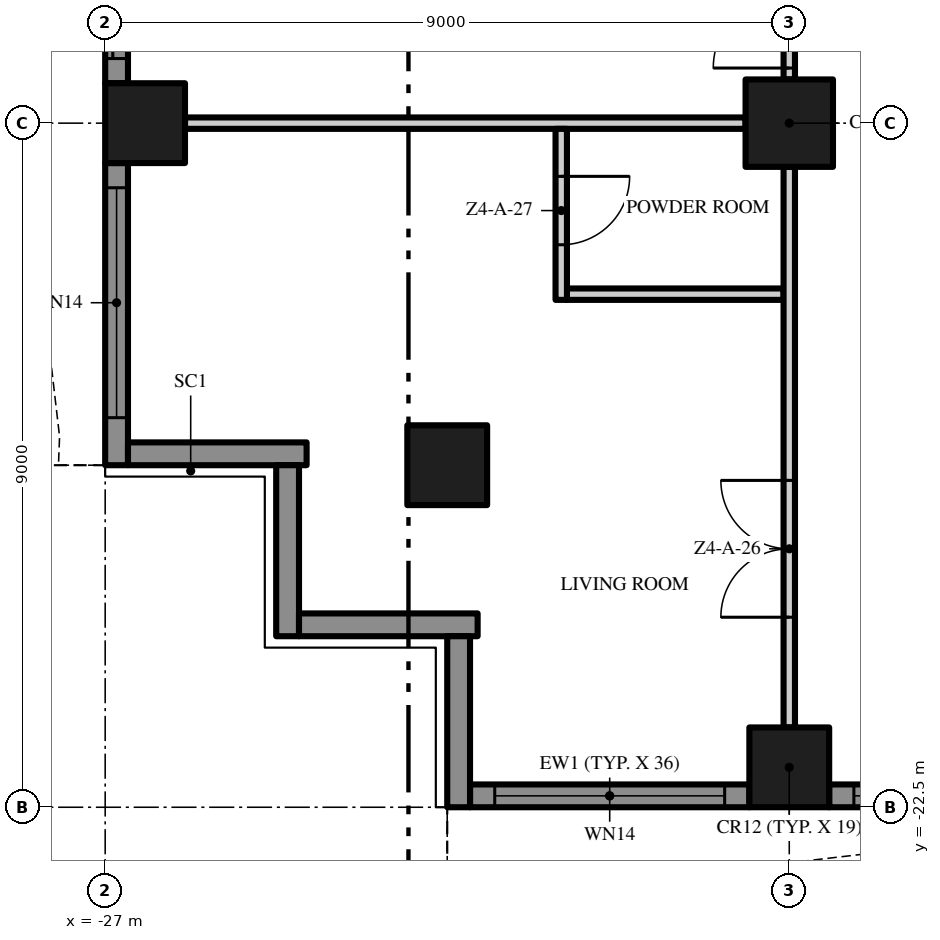
"""IFC4 building model, lengths in metres.
Left out: names, types, materials, properties, quantities, classifications, styles, units other than length and angle.
Written with IfcOpenShell. Run it as: python <this file> out.ifc"""

import sys

from ifc_helpers import new_model, si_unit, direction, frame, frame_2d, origin, origin_2d, place, context, subcontext, project, spatial, polyline, rectangle, outline, extrude, element, fill, save


model = new_model("IFC4")
c1 = context("Model", 3, precision=1e-05, world=origin(), true_north=direction((0.0, 1.0)))
c2 = subcontext(c1, "Body", "Model", "MODEL_VIEW")
j1 = project(units=[si_unit("LENGTHUNIT", "METRE"), si_unit("PLANEANGLEUNIT", "RADIAN")], contexts=[c1])
p1 = place(None, origin())
s1 = spatial("IfcSite", under=j1, at=p1, CompositionType="ELEMENT")
p2 = place(p1, origin())
s2 = spatial("IfcBuilding", under=s1, at=p2, CompositionType="ELEMENT")
p3 = place(p2, frame((0.0, 0.0, 192.0)))
s3 = spatial("IfcBuildingStorey", under=s2, at=p3, CompositionType="ELEMENT", Elevation=192.0)
p4 = place(p3, frame((-18.0, -13.5, 0.0), z_axis=(0.0, 0.0, 1.0), x_axis=(1.0, 0.0, 0.0)))
e1 = element("IfcColumn", 1, at=p4, inside=s3, PredefinedType="COLUMN", context=c2, shape_type="SweptSolid", body=[
    extrude(rectangle(XDim=1.15, YDim=1.15, at=origin_2d()), origin(), (0.0, 0.0, 1.0), 3.5),
])
for number, where, z_axis, x_axis in (
    (2, (-18.0, -21.975, 0.0), (0.0, 0.0, 1.0), (1.0, 0.0, 0.0)),
    (3, (-26.475, -13.5, 0.0), (0.0, 0.0, 1.0), (1.0, 0.0, 0.0)),
    (4, (-22.5, -18.0, 0.0), (0.0, 0.0, 1.0), (1.0, 0.0, 0.0)),
):
    element("IfcColumn", number, at=place(p3, frame(where, z_axis=z_axis, x_axis=x_axis)), inside=s3, PredefinedType="COLUMN", context=c2, shape_type="SweptSolid", body=[
        extrude(rectangle(XDim=1.05, YDim=1.05, at=origin_2d()), origin(), (0.0, 0.0, 1.0), 3.5),
    ])
p5 = place(p3, frame((-18.525, -22.35, 0.0), z_axis=(0.0, 0.0, 1.0), x_axis=(-1.0, 0.0, 0.0)))
e5 = element("IfcWall", 5, at=p5, inside=s3, PredefinedType="SOLIDWALL", context=c2, shape_type="SweptSolid", body=[
    extrude(rectangle(XDim=3.675, YDim=0.3, at=frame_2d((1.837, 0.0))), origin(), (0.0, 0.0, 1.0), 3.5),
])
p6 = place(p5, frame((0.325, 0.0, 0.45)))
e6 = element("IfcOpeningElement", 6, at=p6, cuts=e5, PredefinedType="OPENING", context=c2, shape_type="SweptSolid", body=[
    extrude(rectangle(XDim=3.025, YDim=2.65, at=frame_2d((1.512, 1.325))), frame((0.0, 0.16, 0.0), z_axis=(0.0, -1.0, 0.0), x_axis=(1.0, 0.0, 0.0)), (0.0, 0.0, 1.0), 0.32),
])
p7 = place(p3, frame((-9.525, -22.35, 0.0), z_axis=(0.0, 0.0, 1.0), x_axis=(-1.0, 0.0, 0.0)))
e7 = element("IfcWall", 7, at=p7, inside=s3, PredefinedType="SOLIDWALL", context=c2, shape_type="SweptSolid", body=[
    extrude(rectangle(XDim=7.95, YDim=0.3, at=frame_2d((3.975, 0.0))), origin(), (0.0, 0.0, 1.0), 3.5),
])
p8 = place(p7, frame((4.6, 0.0, 0.45)))
e8 = element("IfcOpeningElement", 8, at=p8, cuts=e7, PredefinedType="OPENING", context=c2, shape_type="SweptSolid", body=[
    extrude(rectangle(XDim=3.025, YDim=2.65, at=frame_2d((1.512, 1.325))), frame((0.0, 0.16, 0.0), z_axis=(0.0, -1.0, 0.0), x_axis=(1.0, 0.0, 0.0)), (0.0, 0.0, 1.0), 0.32),
])
p9 = place(p7, frame((0.325, 0.0, 0.0)))
e9 = element("IfcOpeningElement", 9, at=p9, cuts=e7, PredefinedType="OPENING", context=c2, shape_type="SweptSolid", body=[
    extrude(rectangle(XDim=3.025, YDim=2.4, at=frame_2d((1.512, 1.2))), frame((0.0, 0.16, 0.0), z_axis=(0.0, -1.0, 0.0), x_axis=(1.0, 0.0, 0.0)), (0.0, 0.0, 1.0), 0.32),
])
p10 = place(p3, frame((-26.85, -12.975, 0.0), z_axis=(0.0, 0.0, 1.0), x_axis=(0.0, 1.0, 0.0)))
e10 = element("IfcWall", 10, at=p10, inside=s3, PredefinedType="SOLIDWALL", context=c2, shape_type="SweptSolid", body=[
    extrude(rectangle(XDim=7.95, YDim=0.3, at=frame_2d((3.975, 0.0))), origin(), (0.0, 0.0, 1.0), 3.5),
])
p11 = place(p10, frame((4.6, 0.0, 0.45)))
e11 = element("IfcOpeningElement", 11, at=p11, cuts=e10, PredefinedType="OPENING", context=c2, shape_type="SweptSolid", body=[
    extrude(rectangle(XDim=3.025, YDim=2.65, at=frame_2d((1.512, 1.325))), frame((0.0, 0.16, 0.0), z_axis=(0.0, -1.0, 0.0), x_axis=(1.0, 0.0, 0.0)), (0.0, 0.0, 1.0), 0.32),
])
p12 = place(p10, frame((0.325, 0.0, 0.0)))
e12 = element("IfcOpeningElement", 12, at=p12, cuts=e10, PredefinedType="OPENING", context=c2, shape_type="SweptSolid", body=[
    extrude(rectangle(XDim=3.025, YDim=2.4, at=frame_2d((1.512, 1.2))), frame((0.0, 0.16, 0.0), z_axis=(0.0, -1.0, 0.0), x_axis=(1.0, 0.0, 0.0)), (0.0, 0.0, 1.0), 0.32),
])
p13 = place(p3, frame((-26.85, -18.0, 0.0), z_axis=(0.0, 0.0, 1.0), x_axis=(0.0, 1.0, 0.0)))
e13 = element("IfcWall", 13, at=p13, inside=s3, PredefinedType="SOLIDWALL", context=c2, shape_type="SweptSolid", body=[
    extrude(rectangle(XDim=3.975, YDim=0.3, at=frame_2d((1.988, 0.0))), origin(), (0.0, 0.0, 1.0), 3.5),
])
p14 = place(p13, frame((0.625, 0.0, 0.45)))
e14 = element("IfcOpeningElement", 14, at=p14, cuts=e13, PredefinedType="OPENING", context=c2, shape_type="SweptSolid", body=[
    extrude(rectangle(XDim=3.025, YDim=2.65, at=frame_2d((1.512, 1.325))), frame((0.0, 0.16, 0.0), z_axis=(0.0, -1.0, 0.0), x_axis=(1.0, 0.0, 0.0)), (0.0, 0.0, 1.0), 0.32),
])
p15 = place(p3, frame((-24.35, -17.85, 0.0), z_axis=(0.0, 0.0, 1.0), x_axis=(-1.0, 0.0, 0.0)))
e15 = element("IfcWall", 15, at=p15, inside=s3, PredefinedType="SOLIDWALL", context=c2, shape_type="SweptSolid", body=[
    extrude(rectangle(XDim=2.35, YDim=0.3, at=frame_2d((1.175, 0.0))), origin(), (0.0, 0.0, 1.0), 3.5),
])
p16 = place(p3, frame((-24.6, -20.25, 0.0), z_axis=(0.0, 0.0, 1.0), x_axis=(0.0, 1.0, 0.0)))
e16 = element("IfcWall", 16, at=p16, inside=s3, PredefinedType="SOLIDWALL", context=c2, shape_type="SweptSolid", body=[
    extrude(rectangle(XDim=2.25, YDim=0.3, at=frame_2d((1.125, 0.0))), origin(), (0.0, 0.0, 1.0), 3.5),
])
p17 = place(p3, frame((-22.1, -20.1, 0.0), z_axis=(0.0, 0.0, 1.0), x_axis=(-1.0, 0.0, 0.0)))
e17 = element("IfcWall", 17, at=p17, inside=s3, PredefinedType="SOLIDWALL", context=c2, shape_type="SweptSolid", body=[
    extrude(rectangle(XDim=2.35, YDim=0.3, at=frame_2d((1.175, 0.0))), origin(), (0.0, 0.0, 1.0), 3.5),
])
p18 = place(p3, frame((-22.35, -22.5, 0.0), z_axis=(0.0, 0.0, 1.0), x_axis=(0.0, 1.0, 0.0)))
e18 = element("IfcWall", 18, at=p18, inside=s3, PredefinedType="SOLIDWALL", context=c2, shape_type="SweptSolid", body=[
    extrude(rectangle(XDim=2.25, YDim=0.3, at=frame_2d((1.125, 0.0))), origin(), (0.0, 0.0, 1.0), 3.5),
])
p19 = place(p3, origin())
e19 = element("IfcWall", 19, at=p19, inside=s3, PredefinedType="USERDEFINED", context=c2, shape_type="SweptSolid", body=[
    extrude(outline(polyline([(-22.5, -25.149), (-21.0, -24.488), (-19.5, -23.755), (-18.0, -23.231), (-16.875, -23.1), (-16.5, -23.115), (-15.0, -23.451), (-13.5, -24.112), (-12.0, -24.845), (-10.5, -25.369), (-9.375, -25.5), (-9.0, -25.485), (-7.5, -25.149), (-6.0, -24.488), (-4.5, -23.755), (-3.0, -23.231), (-1.875, -23.1), (-1.5, -23.115), (0.0, -23.451), (1.5, -24.112), (3.0, -24.845), (4.5, -25.369), (5.625, -25.5), (6.0, -25.485), (7.5, -25.149), (9.0, -24.488), (10.5, -23.755), (12.0, -23.231), (13.125, -23.1), (13.5, -23.115), (15.0, -23.451), (16.5, -24.112), (18.0, -24.845), (19.5, -25.369), (20.625, -25.5), (21.0, -25.485), (22.5, -25.149), (22.445, -24.905), (20.967, -25.236), (20.635, -25.249), (19.556, -25.124), (18.096, -24.614), (16.605, -23.885), (15.079, -23.213), (13.533, -22.866), (13.115, -22.849), (11.944, -22.986), (10.404, -23.524), (8.895, -24.261), (7.421, -24.91), (5.967, -25.236), (5.635, -25.249), (4.556, -25.124), (3.096, -24.614), (1.605, -23.885), (0.079, -23.213), (-1.467, -22.866), (-1.885, -22.849), (-3.056, -22.986), (-4.596, -23.524), (-6.105, -24.261), (-7.579, -24.91), (-9.033, -25.236), (-9.365, -25.249), (-10.444, -25.124), (-11.904, -24.614), (-13.395, -23.885), (-14.921, -23.213), (-16.467, -22.866), (-16.885, -22.849), (-18.056, -22.986), (-19.596, -23.524), (-21.105, -24.261), (-22.601, -24.92), (-22.5, -25.149)])), origin(), (0.0, 0.0, 1.0), 0.9),
])
p20 = place(p3, origin())
e20 = element("IfcWall", 20, at=p20, inside=s3, PredefinedType="USERDEFINED", context=c2, shape_type="SweptSolid", body=[
    extrude(outline(polyline([(-29.649, 18.0), (-28.988, 16.5), (-28.255, 15.0), (-27.731, 13.5), (-27.6, 12.375), (-27.615, 12.0), (-27.951, 10.5), (-28.612, 9.0), (-29.345, 7.5), (-29.869, 6.0), (-30.0, 4.875), (-29.985, 4.5), (-29.649, 3.0), (-28.988, 1.5), (-28.255, 0.0), (-27.731, -1.5), (-27.6, -2.625), (-27.615, -3.0), (-27.951, -4.5), (-28.612, -6.0), (-29.345, -7.5), (-29.869, -9.0), (-30.0, -10.125), (-29.985, -10.5), (-29.649, -12.0), (-28.988, -13.5), (-28.255, -15.0), (-27.731, -16.5), (-27.6, -17.625), (-27.615, -18.0), (-27.365, -18.01), (-27.349, -17.615), (-27.486, -16.444), (-28.024, -14.904), (-28.761, -13.395), (-29.41, -11.921), (-29.736, -10.467), (-29.749, -10.135), (-29.624, -9.056), (-29.114, -7.596), (-28.385, -6.105), (-27.713, -4.579), (-27.366, -3.033), (-27.349, -2.615), (-27.486, -1.444), (-28.024, 0.096), (-28.761, 1.605), (-29.41, 3.079), (-29.736, 4.533), (-29.749, 4.865), (-29.624, 5.944), (-29.114, 7.404), (-28.385, 8.895), (-27.713, 10.421), (-27.366, 11.967), (-27.349, 12.385), (-27.486, 13.556), (-28.024, 15.096), (-28.761, 16.605), (-29.42, 18.101), (-29.649, 18.0)])), origin(), (0.0, 0.0, 1.0), 0.9),
])
p21 = place(p3, frame((-20.925, -15.75, 0.0), z_axis=(0.0, 0.0, 1.0), x_axis=(1.0, 0.0, 0.0)))
e21 = element("IfcWall", 21, at=p21, inside=s3, PredefinedType="PARTITIONING", context=c2, shape_type="SweptSolid", body=[
    extrude(rectangle(XDim=2.85, YDim=0.15, at=frame_2d((1.425, 0.0))), origin(), (0.0, 0.0, 1.0), 3.5),
])
p22 = place(p3, frame((-25.95, -13.5, 0.0), z_axis=(0.0, 0.0, 1.0), x_axis=(1.0, 0.0, 0.0)))
e22 = element("IfcWall", 22, at=p22, inside=s3, PredefinedType="PARTITIONING", context=c2, shape_type="SweptSolid", body=[
    extrude(rectangle(XDim=7.375, YDim=0.15, at=frame_2d((3.688, 0.0))), origin(), (0.0, 0.0, 1.0), 3.5),
])
p23 = place(p3, frame((-21.0, -13.575, 0.0), z_axis=(0.0, 0.0, 1.0), x_axis=(0.0, -1.0, 0.0)))
e23 = element("IfcWall", 23, at=p23, inside=s3, PredefinedType="PARTITIONING", context=c2, shape_type="SweptSolid", body=[
    extrude(rectangle(XDim=2.25, YDim=0.15, at=frame_2d((1.125, 0.0))), origin(), (0.0, 0.0, 1.0), 3.5),
])
p24 = place(p23, frame((0.625, 0.0, 0.0)))
e24 = element("IfcOpeningElement", 24, at=p24, cuts=e23, PredefinedType="OPENING", context=c2, shape_type="SweptSolid", body=[
    extrude(rectangle(XDim=0.9, YDim=2.1, at=frame_2d((0.45, 1.05))), frame((0.0, 0.085, 0.0), z_axis=(0.0, -1.0, 0.0), x_axis=(1.0, 0.0, 0.0)), (0.0, 0.0, 1.0), 0.17),
])
p25 = place(p3, frame((-18.0, -21.45, 0.0), z_axis=(0.0, 0.0, 1.0), x_axis=(0.0, 1.0, 0.0)))
e25 = element("IfcWall", 25, at=p25, inside=s3, PredefinedType="PARTITIONING", context=c2, shape_type="SweptSolid", body=[
    extrude(rectangle(XDim=7.375, YDim=0.15, at=frame_2d((3.688, 0.0))), origin(), (0.0, 0.0, 1.0), 3.5),
])
p26 = place(p25, frame((1.45, 0.0, 0.0)))
e26 = element("IfcOpeningElement", 26, at=p26, cuts=e25, PredefinedType="OPENING", context=c2, shape_type="SweptSolid", body=[
    extrude(rectangle(XDim=1.8, YDim=2.4, at=frame_2d((0.9, 1.2))), frame((0.0, 0.085, 0.0), z_axis=(0.0, -1.0, 0.0), x_axis=(1.0, 0.0, 0.0)), (0.0, 0.0, 1.0), 0.17),
])
p27 = place(p3, frame((-18.0, -12.925, 0.0), z_axis=(0.0, 0.0, 1.0), x_axis=(0.0, 1.0, 0.0)))
e27 = element("IfcWall", 27, at=p27, inside=s3, PredefinedType="PARTITIONING", context=c2, shape_type="SweptSolid", body=[
    extrude(rectangle(XDim=7.85, YDim=0.15, at=frame_2d((3.925, 0.0))), origin(), (0.0, 0.0, 1.0), 3.5),
])
p28 = place(p27, frame((6.7, 0.0, 0.0)))
e28 = element("IfcOpeningElement", 28, at=p28, cuts=e27, PredefinedType="OPENING", context=c2, shape_type="SweptSolid", body=[
    extrude(rectangle(XDim=1.0, YDim=2.4, at=frame_2d((0.5, 1.2))), frame((0.0, 0.085, 0.0), z_axis=(0.0, -1.0, 0.0), x_axis=(1.0, 0.0, 0.0)), (0.0, 0.0, 1.0), 0.17),
])
p29 = place(p27, frame((0.15, 0.0, 0.0)))
e29 = element("IfcOpeningElement", 29, at=p29, cuts=e27, PredefinedType="OPENING", context=c2, shape_type="SweptSolid", body=[
    extrude(rectangle(XDim=1.0, YDim=2.4, at=frame_2d((0.5, 1.2))), frame((0.0, 0.085, 0.0), z_axis=(0.0, -1.0, 0.0), x_axis=(1.0, 0.0, 0.0)), (0.0, 0.0, 1.0), 0.17),
])
p30 = place(p6, origin())
e30 = element("IfcWindow", 30, at=p30, inside=s3, PartitioningType="SINGLE_PANEL", PredefinedType="WINDOW", context=c2, shape_type="SweptSolid", body=[
    extrude(rectangle(XDim=3.025, YDim=2.65, at=frame_2d((1.512, 1.325))), frame((0.0, 0.03, 0.0), z_axis=(0.0, -1.0, 0.0), x_axis=(1.0, 0.0, 0.0)), (0.0, 0.0, 1.0), 0.06),
])
fill(e6, e30)
p31 = place(p8, origin())
e31 = element("IfcWindow", 31, at=p31, inside=s3, PartitioningType="SINGLE_PANEL", PredefinedType="WINDOW", context=c2, shape_type="SweptSolid", body=[
    extrude(rectangle(XDim=3.025, YDim=2.65, at=frame_2d((1.512, 1.325))), frame((0.0, 0.03, 0.0), z_axis=(0.0, -1.0, 0.0), x_axis=(1.0, 0.0, 0.0)), (0.0, 0.0, 1.0), 0.06),
])
fill(e8, e31)
p32 = place(p12, origin())
e32 = element("IfcDoor", 32, at=p32, inside=s3, OperationType="SINGLE_SWING_LEFT", PredefinedType="DOOR", context=c2, shape_type="SweptSolid", body=[
    extrude(rectangle(XDim=3.025, YDim=2.4, at=frame_2d((1.512, 1.2))), frame((0.0, 0.025, 0.0), z_axis=(0.0, -1.0, 0.0), x_axis=(1.0, 0.0, 0.0)), (0.0, 0.0, 1.0), 0.05),
])
fill(e12, e32)
p33 = place(p14, origin())
e33 = element("IfcWindow", 33, at=p33, inside=s3, PartitioningType="SINGLE_PANEL", PredefinedType="WINDOW", context=c2, shape_type="SweptSolid", body=[
    extrude(rectangle(XDim=3.025, YDim=2.65, at=frame_2d((1.512, 1.325))), frame((0.0, 0.03, 0.0), z_axis=(0.0, -1.0, 0.0), x_axis=(1.0, 0.0, 0.0)), (0.0, 0.0, 1.0), 0.06),
])
fill(e14, e33)
p34 = place(p29, origin())
e34 = element("IfcDoor", 34, at=p34, inside=s3, OperationType="SINGLE_SWING_LEFT", PredefinedType="DOOR", context=c2, shape_type="SweptSolid", body=[
    extrude(rectangle(XDim=1.0, YDim=2.4, at=frame_2d((0.5, 1.2))), frame((0.0, 0.025, 0.0), z_axis=(0.0, -1.0, 0.0), x_axis=(1.0, 0.0, 0.0)), (0.0, 0.0, 1.0), 0.05),
])
fill(e29, e34)
p35 = place(p26, origin())
e35 = element("IfcDoor", 35, at=p35, inside=s3, OperationType="DOUBLE_DOOR_SINGLE_SWING", PredefinedType="DOOR", context=c2, shape_type="SweptSolid", body=[
    extrude(rectangle(XDim=1.8, YDim=2.4, at=frame_2d((0.9, 1.2))), frame((0.0, 0.025, 0.0), z_axis=(0.0, -1.0, 0.0), x_axis=(1.0, 0.0, 0.0)), (0.0, 0.0, 1.0), 0.05),
])
fill(e26, e35)
p36 = place(p24, origin())
e36 = element("IfcDoor", 36, at=p36, inside=s3, OperationType="SINGLE_SWING_LEFT", PredefinedType="DOOR", context=c2, shape_type="SweptSolid", body=[
    extrude(rectangle(XDim=0.9, YDim=2.1, at=frame_2d((0.45, 1.05))), frame((0.0, 0.025, 0.0), z_axis=(0.0, -1.0, 0.0), x_axis=(1.0, 0.0, 0.0)), (0.0, 0.0, 1.0), 0.05),
])
fill(e24, e36)
save(model, sys.argv[1])
